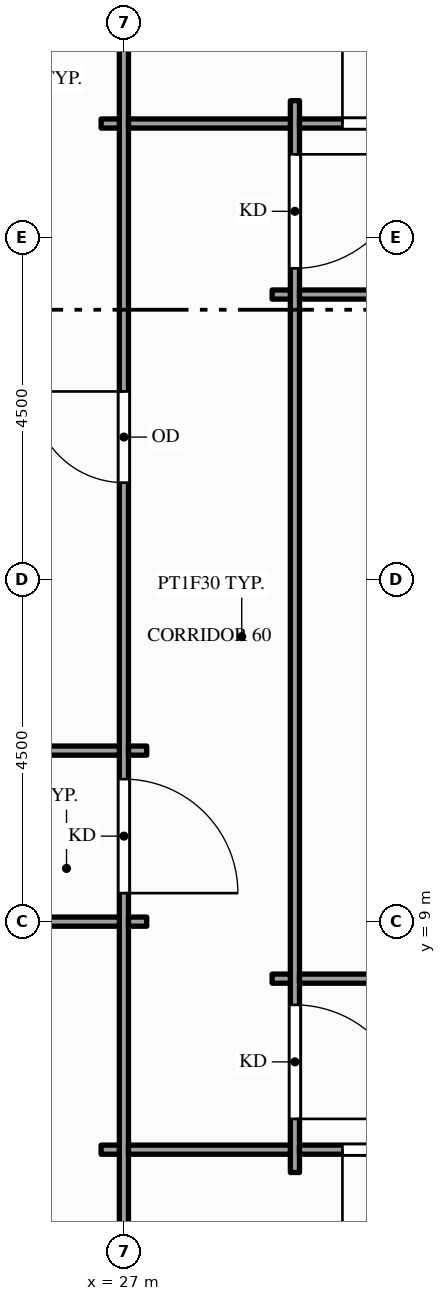
"""IFC4 building model, lengths in metres.
Left out: names, types, materials, properties, quantities, classifications, styles, units other than length and angle.
Written with IfcOpenShell. Run it as: python <this file> out.ifc"""

import sys

from ifc_helpers import new_model, si_unit, direction, frame, frame_2d, origin, place, context, subcontext, project, spatial, rectangle, extrude, element, fill, save


model = new_model("IFC4")
c1 = context("Model", 3, precision=1e-05, world=origin(), true_north=direction((0.0, 1.0)))
c2 = subcontext(c1, "Body", "Model", "MODEL_VIEW")
j1 = project(units=[si_unit("LENGTHUNIT", "METRE"), si_unit("PLANEANGLEUNIT", "RADIAN")], contexts=[c1])
p1 = place(None, origin())
s1 = spatial("IfcSite", under=j1, at=p1, CompositionType="ELEMENT")
p2 = place(p1, origin())
s2 = spatial("IfcBuilding", under=s1, at=p2, CompositionType="ELEMENT")
p3 = place(p2, frame((0.0, 0.0, 183.0)))
s3 = spatial("IfcBuildingStorey", under=s2, at=p3, CompositionType="ELEMENT", Elevation=183.0)
p4 = place(p3, frame((27.0, 1.65, 0.0), z_axis=(0.0, 0.0, 1.0), x_axis=(0.0, 1.0, 0.0)))
e1 = element("IfcWall", 1, at=p4, inside=s3, PredefinedType="PARTITIONING", context=c2, shape_type="SweptSolid", body=[
    extrude(rectangle(XDim=22.2, YDim=0.12, at=frame_2d((11.1, 0.0))), origin(), (0.0, 0.0, 1.0), 2.35),
])
p5 = place(p4, frame((7.725, 0.0, 0.0)))
e2 = element("IfcOpeningElement", 2, at=p5, cuts=e1, PredefinedType="OPENING", context=c2, shape_type="SweptSolid", body=[
    extrude(rectangle(XDim=1.5, YDim=2.1, at=frame_2d((0.75, 1.05))), frame((0.0, 0.07, 0.0), z_axis=(0.0, -1.0, 0.0), x_axis=(1.0, 0.0, 0.0)), (0.0, 0.0, 1.0), 0.14),
])
p6 = place(p4, frame((13.125, 0.0, 0.0)))
e3 = element("IfcOpeningElement", 3, at=p6, cuts=e1, PredefinedType="OPENING", context=c2, shape_type="SweptSolid", body=[
    extrude(rectangle(XDim=1.2, YDim=2.1, at=frame_2d((0.6, 1.05))), frame((0.0, 0.07, 0.0), z_axis=(0.0, -1.0, 0.0), x_axis=(1.0, 0.0, 0.0)), (0.0, 0.0, 1.0), 0.14),
])
p7 = place(p3, frame((29.25, 5.7, 0.0), z_axis=(0.0, 0.0, 1.0), x_axis=(0.0, 1.0, 0.0)))
e4 = element("IfcWall", 4, at=p7, inside=s3, PredefinedType="PARTITIONING", context=c2, shape_type="SweptSolid", body=[
    extrude(rectangle(XDim=14.1, YDim=0.12, at=frame_2d((7.05, 0.0))), origin(), (0.0, 0.0, 1.0), 2.77),
])
p8 = place(p7, frame((0.705, 0.0, 0.0)))
e5 = element("IfcOpeningElement", 5, at=p8, cuts=e4, PredefinedType="OPENING", context=c2, shape_type="SweptSolid", body=[
    extrude(rectangle(XDim=1.5, YDim=2.1, at=frame_2d((0.75, 1.05))), frame((0.0, 0.07, 0.0), z_axis=(0.0, -1.0, 0.0), x_axis=(1.0, 0.0, 0.0)), (0.0, 0.0, 1.0), 0.14),
])
p9 = place(p7, frame((11.895, 0.0, 0.0)))
e6 = element("IfcOpeningElement", 6, at=p9, cuts=e4, PredefinedType="OPENING", context=c2, shape_type="SweptSolid", body=[
    extrude(rectangle(XDim=1.5, YDim=2.1, at=frame_2d((0.75, 1.05))), frame((0.0, 0.07, 0.0), z_axis=(0.0, -1.0, 0.0), x_axis=(1.0, 0.0, 0.0)), (0.0, 0.0, 1.0), 0.14),
])
p10 = place(p3, frame((26.7, 6.0, 0.0), z_axis=(0.0, 0.0, 1.0), x_axis=(1.0, 0.0, 0.0)))
e7 = element("IfcWall", 7, at=p10, inside=s3, PredefinedType="PARTITIONING", context=c2, shape_type="SweptSolid", body=[
    extrude(rectangle(XDim=0.24, YDim=0.12, at=frame_2d((0.12, 0.0))), origin(), (0.0, 0.0, 1.0), 2.77),
])
p11 = place(p3, frame((27.06, 6.0, 0.0), z_axis=(0.0, 0.0, 1.0), x_axis=(1.0, 0.0, 0.0)))
e8 = element("IfcWall", 8, at=p11, inside=s3, PredefinedType="PARTITIONING", context=c2, shape_type="SweptSolid", body=[
    extrude(rectangle(XDim=2.13, YDim=0.12, at=frame_2d((1.065, 0.0))), origin(), (0.0, 0.0, 1.0), 2.77),
])
p12 = place(p3, frame((29.31, 6.0, 0.0), z_axis=(0.0, 0.0, 1.0), x_axis=(1.0, 0.0, 0.0)))
e9 = element("IfcWall", 9, at=p12, inside=s3, PredefinedType="PARTITIONING", context=c2, shape_type="SweptSolid", body=[
    extrude(rectangle(XDim=2.13, YDim=0.12, at=frame_2d((1.065, 0.0))), origin(), (0.0, 0.0, 1.0), 2.77),
])
p13 = place(p12, frame((0.565, 0.0, 0.0)))
e10 = element("IfcOpeningElement", 10, at=p13, cuts=e9, PredefinedType="OPENING", context=c2, shape_type="SweptSolid", body=[
    extrude(rectangle(XDim=1.0, YDim=2.1, at=frame_2d((0.5, 1.05))), frame((0.0, 0.07, 0.0), z_axis=(0.0, -1.0, 0.0), x_axis=(1.0, 0.0, 0.0)), (0.0, 0.0, 1.0), 0.14),
])
p14 = place(p3, frame((28.95, 8.25, 0.0), z_axis=(0.0, 0.0, 1.0), x_axis=(1.0, 0.0, 0.0)))
e11 = element("IfcWall", 11, at=p14, inside=s3, PredefinedType="PARTITIONING", context=c2, shape_type="SweptSolid", body=[
    extrude(rectangle(XDim=0.24, YDim=0.12, at=frame_2d((0.12, 0.0))), origin(), (0.0, 0.0, 1.0), 2.77),
])
p15 = place(p3, frame((29.31, 8.25, 0.0), z_axis=(0.0, 0.0, 1.0), x_axis=(1.0, 0.0, 0.0)))
e12 = element("IfcWall", 12, at=p15, inside=s3, PredefinedType="PARTITIONING", context=c2, shape_type="SweptSolid", body=[
    extrude(rectangle(XDim=6.63, YDim=0.12, at=frame_2d((3.315, 0.0))), origin(), (0.0, 0.0, 1.0), 2.77),
])
p16 = place(p15, frame((2.815, 0.0, 0.0)))
e13 = element("IfcOpeningElement", 13, at=p16, cuts=e12, PredefinedType="OPENING", context=c2, shape_type="SweptSolid", body=[
    extrude(rectangle(XDim=1.0, YDim=2.1, at=frame_2d((0.5, 1.05))), frame((0.0, 0.07, 0.0), z_axis=(0.0, -1.0, 0.0), x_axis=(1.0, 0.0, 0.0)), (0.0, 0.0, 1.0), 0.14),
])
p17 = place(p3, frame((22.56, 9.0, 0.0), z_axis=(0.0, 0.0, 1.0), x_axis=(1.0, 0.0, 0.0)))
e14 = element("IfcWall", 14, at=p17, inside=s3, PredefinedType="PARTITIONING", context=c2, shape_type="SweptSolid", body=[
    extrude(rectangle(XDim=4.38, YDim=0.12, at=frame_2d((2.19, 0.0))), origin(), (0.0, 0.0, 1.0), 2.77),
])
p18 = place(p17, frame((1.74, 0.0, 0.0)))
e15 = element("IfcOpeningElement", 15, at=p18, cuts=e14, PredefinedType="OPENING", context=c2, shape_type="SweptSolid", body=[
    extrude(rectangle(XDim=0.9, YDim=2.1, at=frame_2d((0.45, 1.05))), frame((0.0, 0.07, 0.0), z_axis=(0.0, -1.0, 0.0), x_axis=(1.0, 0.0, 0.0)), (0.0, 0.0, 1.0), 0.14),
])
p19 = place(p3, frame((27.06, 9.0, 0.0), z_axis=(0.0, 0.0, 1.0), x_axis=(1.0, 0.0, 0.0)))
e16 = element("IfcWall", 16, at=p19, inside=s3, PredefinedType="PARTITIONING", context=c2, shape_type="SweptSolid", body=[
    extrude(rectangle(XDim=0.24, YDim=0.12, at=frame_2d((0.12, 0.0))), origin(), (0.0, 0.0, 1.0), 2.77),
])
p20 = place(p3, frame((13.56, 11.25, 0.0), z_axis=(0.0, 0.0, 1.0), x_axis=(1.0, 0.0, 0.0)))
e17 = element("IfcWall", 17, at=p20, inside=s3, PredefinedType="PARTITIONING", context=c2, shape_type="SweptSolid", body=[
    extrude(rectangle(XDim=13.38, YDim=0.12, at=frame_2d((6.69, 0.0))), origin(), (0.0, 0.0, 1.0), 2.77),
])
p21 = place(p20, frame((3.54, 0.0, 0.0)))
e18 = element("IfcOpeningElement", 18, at=p21, cuts=e17, PredefinedType="OPENING", context=c2, shape_type="SweptSolid", body=[
    extrude(rectangle(XDim=1.8, YDim=2.1, at=frame_2d((0.9, 1.05))), frame((0.0, 0.07, 0.0), z_axis=(0.0, -1.0, 0.0), x_axis=(1.0, 0.0, 0.0)), (0.0, 0.0, 1.0), 0.14),
])
for number, where, z_axis, x_axis in (
    (19, (27.06, 11.25, 0.0), (0.0, 0.0, 1.0), (1.0, 0.0, 0.0)),
    (20, (28.95, 17.25, 0.0), (0.0, 0.0, 1.0), (1.0, 0.0, 0.0)),
):
    element("IfcWall", number, at=place(p3, frame(where, z_axis=z_axis, x_axis=x_axis)), inside=s3, PredefinedType="PARTITIONING", context=c2, shape_type="SweptSolid", body=[
        extrude(rectangle(XDim=0.24, YDim=0.12, at=frame_2d((0.12, 0.0))), origin(), (0.0, 0.0, 1.0), 2.77),
    ])
p22 = place(p3, frame((29.31, 17.25, 0.0), z_axis=(0.0, 0.0, 1.0), x_axis=(1.0, 0.0, 0.0)))
e21 = element("IfcWall", 21, at=p22, inside=s3, PredefinedType="PARTITIONING", context=c2, shape_type="SweptSolid", body=[
    extrude(rectangle(XDim=6.63, YDim=0.12, at=frame_2d((3.315, 0.0))), origin(), (0.0, 0.0, 1.0), 2.77),
])
p23 = place(p3, frame((26.7, 19.5, 0.0), z_axis=(0.0, 0.0, 1.0), x_axis=(1.0, 0.0, 0.0)))
e22 = element("IfcWall", 22, at=p23, inside=s3, PredefinedType="PARTITIONING", context=c2, shape_type="SweptSolid", body=[
    extrude(rectangle(XDim=0.24, YDim=0.12, at=frame_2d((0.12, 0.0))), origin(), (0.0, 0.0, 1.0), 2.77),
])
p24 = place(p3, frame((27.06, 19.5, 0.0), z_axis=(0.0, 0.0, 1.0), x_axis=(1.0, 0.0, 0.0)))
e23 = element("IfcWall", 23, at=p24, inside=s3, PredefinedType="PARTITIONING", context=c2, shape_type="SweptSolid", body=[
    extrude(rectangle(XDim=2.13, YDim=0.12, at=frame_2d((1.065, 0.0))), origin(), (0.0, 0.0, 1.0), 2.77),
])
p25 = place(p3, frame((29.31, 19.5, 0.0), z_axis=(0.0, 0.0, 1.0), x_axis=(1.0, 0.0, 0.0)))
e24 = element("IfcWall", 24, at=p25, inside=s3, PredefinedType="PARTITIONING", context=c2, shape_type="SweptSolid", body=[
    extrude(rectangle(XDim=2.13, YDim=0.12, at=frame_2d((1.065, 0.0))), origin(), (0.0, 0.0, 1.0), 2.77),
])
p26 = place(p25, frame((0.565, 0.0, 0.0)))
e25 = element("IfcOpeningElement", 25, at=p26, cuts=e24, PredefinedType="OPENING", context=c2, shape_type="SweptSolid", body=[
    extrude(rectangle(XDim=1.0, YDim=2.1, at=frame_2d((0.5, 1.05))), frame((0.0, 0.07, 0.0), z_axis=(0.0, -1.0, 0.0), x_axis=(1.0, 0.0, 0.0)), (0.0, 0.0, 1.0), 0.14),
])
p27 = place(p5, origin())
e26 = element("IfcDoor", 26, at=p27, inside=s3, OperationType="SINGLE_SWING_LEFT", PredefinedType="DOOR", context=c2, shape_type="SweptSolid", body=[
    extrude(rectangle(XDim=1.5, YDim=2.1, at=frame_2d((0.75, 1.05))), frame((0.0, 0.025, 0.0), z_axis=(0.0, -1.0, 0.0), x_axis=(1.0, 0.0, 0.0)), (0.0, 0.0, 1.0), 0.05),
])
fill(e2, e26)
p28 = place(p8, origin())
e27 = element("IfcDoor", 27, at=p28, inside=s3, OperationType="SINGLE_SWING_LEFT", PredefinedType="DOOR", context=c2, shape_type="SweptSolid", body=[
    extrude(rectangle(XDim=1.5, YDim=2.1, at=frame_2d((0.75, 1.05))), frame((0.0, 0.025, 0.0), z_axis=(0.0, -1.0, 0.0), x_axis=(1.0, 0.0, 0.0)), (0.0, 0.0, 1.0), 0.05),
])
fill(e5, e27)
p29 = place(p9, origin())
e28 = element("IfcDoor", 28, at=p29, inside=s3, OperationType="SINGLE_SWING_RIGHT", PredefinedType="DOOR", context=c2, shape_type="SweptSolid", body=[
    extrude(rectangle(XDim=1.5, YDim=2.1, at=frame_2d((0.75, 1.05))), frame((0.0, 0.025, 0.0), z_axis=(0.0, -1.0, 0.0), x_axis=(1.0, 0.0, 0.0)), (0.0, 0.0, 1.0), 0.05),
])
fill(e6, e28)
p30 = place(p13, origin())
e29 = element("IfcDoor", 29, at=p30, inside=s3, OperationType="SINGLE_SWING_LEFT", PredefinedType="DOOR", context=c2, shape_type="SweptSolid", body=[
    extrude(rectangle(XDim=1.0, YDim=2.1, at=frame_2d((0.5, 1.05))), frame((0.0, 0.025, 0.0), z_axis=(0.0, -1.0, 0.0), x_axis=(1.0, 0.0, 0.0)), (0.0, 0.0, 1.0), 0.05),
])
fill(e10, e29)
p31 = place(p26, origin())
e30 = element("IfcDoor", 30, at=p31, inside=s3, OperationType="SINGLE_SWING_LEFT", PredefinedType="DOOR", context=c2, shape_type="SweptSolid", body=[
    extrude(rectangle(XDim=1.0, YDim=2.1, at=frame_2d((0.5, 1.05))), frame((0.0, 0.025, 0.0), z_axis=(0.0, -1.0, 0.0), x_axis=(1.0, 0.0, 0.0)), (0.0, 0.0, 1.0), 0.05),
])
fill(e25, e30)
p32 = place(p6, origin())
e31 = element("IfcDoor", 31, at=p32, inside=s3, OperationType="SINGLE_SWING_RIGHT", PredefinedType="DOOR", context=c2, shape_type="SweptSolid", body=[
    extrude(rectangle(XDim=1.2, YDim=2.1, at=frame_2d((0.6, 1.05))), frame((0.0, 0.025, 0.0), z_axis=(0.0, -1.0, 0.0), x_axis=(1.0, 0.0, 0.0)), (0.0, 0.0, 1.0), 0.05),
])
fill(e3, e31)
save(model, sys.argv[1])
